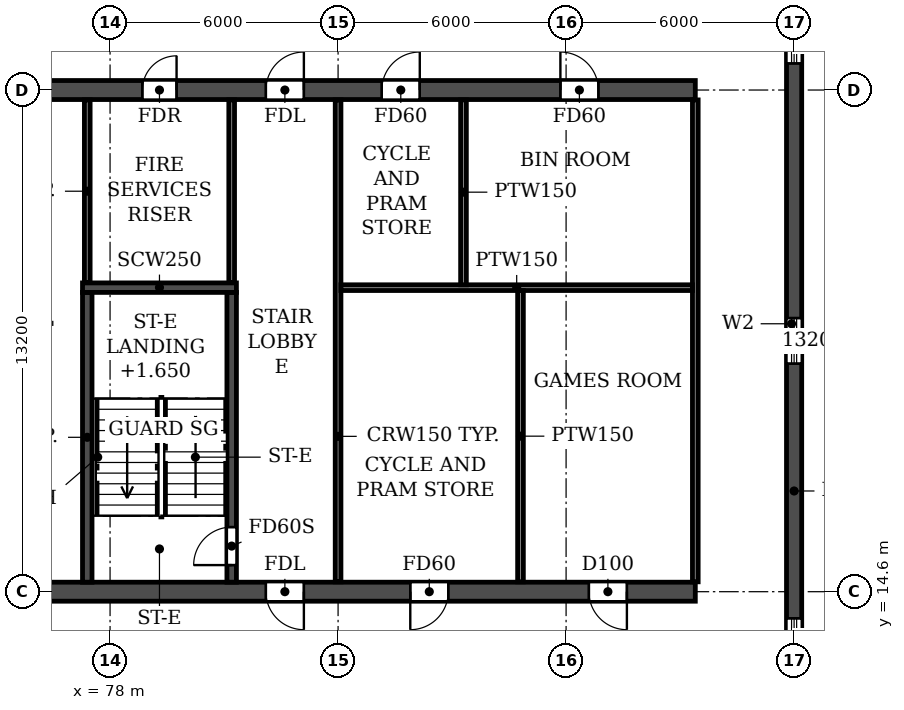
"""IFC4 building model, lengths in metres.
Left out: names, types, materials, properties, quantities, classifications, styles, units other than length and angle.
Written with IfcOpenShell. Run it as: python <this file> out.ifc"""

import sys

from ifc_helpers import new_model, si_unit, direction, frame, frame_2d, origin, place, context, subcontext, project, spatial, rectangle, extrude, element, fill, save


model = new_model("IFC4")
c1 = context("Model", 3, precision=1e-05, world=origin(), true_north=direction((0.0, 1.0)))
c2 = subcontext(c1, "Body", "Model", "MODEL_VIEW")
j1 = project(units=[si_unit("LENGTHUNIT", "METRE"), si_unit("PLANEANGLEUNIT", "RADIAN")], contexts=[c1])
p1 = place(None, origin())
s1 = spatial("IfcSite", under=j1, at=p1, CompositionType="ELEMENT")
p2 = place(p1, origin())
s2 = spatial("IfcBuilding", under=s1, at=p2, CompositionType="ELEMENT")
p3 = place(p2, frame((0.0, 0.0, 82.8)))
s3 = spatial("IfcBuildingStorey", under=s2, at=p3, CompositionType="ELEMENT", Elevation=82.8)
p4 = place(p3, frame((96.0, 4.683, 0.0), z_axis=(0.0, 0.0, 1.0), x_axis=(0.0, 1.0, 0.0)))
e1 = element("IfcWall", 1, at=p4, inside=s3, PredefinedType="SHEAR", context=c2, shape_type="SweptSolid", body=[
    extrude(rectangle(XDim=34.234, YDim=0.4, at=frame_2d((17.117, 0.0))), origin(), (0.0, 0.0, 1.0), 3.06),
])
p5 = place(p4, frame((15.917, 0.0, 0.9)))
e2 = element("IfcOpeningElement", 2, at=p5, cuts=e1, PredefinedType="OPENING", context=c2, shape_type="SweptSolid", body=[
    extrude(rectangle(XDim=1.2, YDim=1.5, at=frame_2d((0.6, 0.75))), frame((0.0, 0.21, 0.0), z_axis=(0.0, -1.0, 0.0), x_axis=(1.0, 0.0, 0.0)), (0.0, 0.0, 1.0), 0.42),
])
p6 = place(p4, frame((23.817, 0.0, 0.9)))
e3 = element("IfcOpeningElement", 3, at=p6, cuts=e1, PredefinedType="OPENING", context=c2, shape_type="SweptSolid", body=[
    extrude(rectangle(XDim=1.2, YDim=1.5, at=frame_2d((0.6, 0.75))), frame((0.0, 0.21, 0.0), z_axis=(0.0, -1.0, 0.0), x_axis=(1.0, 0.0, 0.0)), (0.0, 0.0, 1.0), 0.42),
])
p7 = place(p4, frame((8.017, 0.0, 0.9)))
e4 = element("IfcOpeningElement", 4, at=p7, cuts=e1, PredefinedType="OPENING", context=c2, shape_type="SweptSolid", body=[
    extrude(rectangle(XDim=1.2, YDim=1.5, at=frame_2d((0.6, 0.75))), frame((0.0, 0.21, 0.0), z_axis=(0.0, -1.0, 0.0), x_axis=(1.0, 0.0, 0.0)), (0.0, 0.0, 1.0), 0.42),
])
p8 = place(p4, frame((28.894, 0.0, 0.6)))
e5 = element("IfcOpeningElement", 5, at=p8, cuts=e1, PredefinedType="OPENING", context=c2, shape_type="SweptSolid", body=[
    extrude(rectangle(XDim=2.2, YDim=1.8, at=frame_2d((1.1, 0.9))), frame((0.0, 0.21, 0.0), z_axis=(0.0, -1.0, 0.0), x_axis=(1.0, 0.0, 0.0)), (0.0, 0.0, 1.0), 0.42),
])
p9 = place(p4, frame((2.541, 0.0, 0.6)))
e6 = element("IfcOpeningElement", 6, at=p9, cuts=e1, PredefinedType="OPENING", context=c2, shape_type="SweptSolid", body=[
    extrude(rectangle(XDim=2.2, YDim=1.8, at=frame_2d((1.1, 0.9))), frame((0.0, 0.21, 0.0), z_axis=(0.0, -1.0, 0.0), x_axis=(1.0, 0.0, 0.0)), (0.0, 0.0, 1.0), 0.42),
])
p10 = place(p3, frame((8.6, 14.6, 0.0), z_axis=(0.0, 0.0, 1.0), x_axis=(1.0, 0.0, 0.0)))
e7 = element("IfcWall", 7, at=p10, inside=s3, PredefinedType="SOLIDWALL", context=c2, shape_type="SweptSolid", body=[
    extrude(rectangle(XDim=84.8, YDim=0.5, at=frame_2d((42.4, 0.0))), origin(), (0.0, 0.0, 1.0), 3.06),
])
p11 = place(p10, frame((1.2, 0.0, 0.0)))
e8 = element("IfcOpeningElement", 8, at=p11, cuts=e7, PredefinedType="OPENING", context=c2, shape_type="SweptSolid", body=[
    extrude(rectangle(XDim=1.0, YDim=2.1, at=frame_2d((0.5, 1.05))), frame((0.0, 0.26, 0.0), z_axis=(0.0, -1.0, 0.0), x_axis=(1.0, 0.0, 0.0)), (0.0, 0.0, 1.0), 0.52),
])
p12 = place(p10, frame((5.9, 0.0, 0.0)))
e9 = element("IfcOpeningElement", 9, at=p12, cuts=e7, PredefinedType="OPENING", context=c2, shape_type="SweptSolid", body=[
    extrude(rectangle(XDim=1.0, YDim=2.1, at=frame_2d((0.5, 1.05))), frame((0.0, 0.26, 0.0), z_axis=(0.0, -1.0, 0.0), x_axis=(1.0, 0.0, 0.0)), (0.0, 0.0, 1.0), 0.52),
])
p13 = place(p10, frame((10.3, 0.0, 0.0)))
e10 = element("IfcOpeningElement", 10, at=p13, cuts=e7, PredefinedType="OPENING", context=c2, shape_type="SweptSolid", body=[
    extrude(rectangle(XDim=1.0, YDim=2.1, at=frame_2d((0.5, 1.05))), frame((0.0, 0.26, 0.0), z_axis=(0.0, -1.0, 0.0), x_axis=(1.0, 0.0, 0.0)), (0.0, 0.0, 1.0), 0.52),
])
p14 = place(p10, frame((18.2, 0.0, 0.0)))
e11 = element("IfcOpeningElement", 11, at=p14, cuts=e7, PredefinedType="OPENING", context=c2, shape_type="SweptSolid", body=[
    extrude(rectangle(XDim=1.0, YDim=2.1, at=frame_2d((0.5, 1.05))), frame((0.0, 0.26, 0.0), z_axis=(0.0, -1.0, 0.0), x_axis=(1.0, 0.0, 0.0)), (0.0, 0.0, 1.0), 0.52),
])
p15 = place(p10, frame((22.8, 0.0, 0.0)))
e12 = element("IfcOpeningElement", 12, at=p15, cuts=e7, PredefinedType="OPENING", context=c2, shape_type="SweptSolid", body=[
    extrude(rectangle(XDim=1.0, YDim=2.1, at=frame_2d((0.5, 1.05))), frame((0.0, 0.26, 0.0), z_axis=(0.0, -1.0, 0.0), x_axis=(1.0, 0.0, 0.0)), (0.0, 0.0, 1.0), 0.52),
])
p16 = place(p10, frame((36.7, 0.0, 0.0)))
e13 = element("IfcOpeningElement", 13, at=p16, cuts=e7, PredefinedType="OPENING", context=c2, shape_type="SweptSolid", body=[
    extrude(rectangle(XDim=1.0, YDim=2.1, at=frame_2d((0.5, 1.05))), frame((0.0, 0.26, 0.0), z_axis=(0.0, -1.0, 0.0), x_axis=(1.0, 0.0, 0.0)), (0.0, 0.0, 1.0), 0.52),
])
p17 = place(p10, frame((41.9, 0.0, 0.0)))
e14 = element("IfcOpeningElement", 14, at=p17, cuts=e7, PredefinedType="OPENING", context=c2, shape_type="SweptSolid", body=[
    extrude(rectangle(XDim=1.0, YDim=2.1, at=frame_2d((0.5, 1.05))), frame((0.0, 0.26, 0.0), z_axis=(0.0, -1.0, 0.0), x_axis=(1.0, 0.0, 0.0)), (0.0, 0.0, 1.0), 0.52),
])
p18 = place(p10, frame((44.5, 0.0, 0.0)))
e15 = element("IfcOpeningElement", 15, at=p18, cuts=e7, PredefinedType="OPENING", context=c2, shape_type="SweptSolid", body=[
    extrude(rectangle(XDim=1.0, YDim=2.1, at=frame_2d((0.5, 1.05))), frame((0.0, 0.26, 0.0), z_axis=(0.0, -1.0, 0.0), x_axis=(1.0, 0.0, 0.0)), (0.0, 0.0, 1.0), 0.52),
])
p19 = place(p10, frame((48.4, 0.0, 0.0)))
e16 = element("IfcOpeningElement", 16, at=p19, cuts=e7, PredefinedType="OPENING", context=c2, shape_type="SweptSolid", body=[
    extrude(rectangle(XDim=1.0, YDim=2.1, at=frame_2d((0.5, 1.05))), frame((0.0, 0.26, 0.0), z_axis=(0.0, -1.0, 0.0), x_axis=(1.0, 0.0, 0.0)), (0.0, 0.0, 1.0), 0.52),
])
p20 = place(p10, frame((61.0, 0.0, 0.0)))
e17 = element("IfcOpeningElement", 17, at=p20, cuts=e7, PredefinedType="OPENING", context=c2, shape_type="SweptSolid", body=[
    extrude(rectangle(XDim=1.0, YDim=2.1, at=frame_2d((0.5, 1.05))), frame((0.0, 0.26, 0.0), z_axis=(0.0, -1.0, 0.0), x_axis=(1.0, 0.0, 0.0)), (0.0, 0.0, 1.0), 0.52),
])
p21 = place(p10, frame((65.6, 0.0, 0.0)))
e18 = element("IfcOpeningElement", 18, at=p21, cuts=e7, PredefinedType="OPENING", context=c2, shape_type="SweptSolid", body=[
    extrude(rectangle(XDim=1.0, YDim=2.1, at=frame_2d((0.5, 1.05))), frame((0.0, 0.26, 0.0), z_axis=(0.0, -1.0, 0.0), x_axis=(1.0, 0.0, 0.0)), (0.0, 0.0, 1.0), 0.52),
])
p22 = place(p10, frame((73.5, 0.0, 0.0)))
e19 = element("IfcOpeningElement", 19, at=p22, cuts=e7, PredefinedType="OPENING", context=c2, shape_type="SweptSolid", body=[
    extrude(rectangle(XDim=1.0, YDim=2.1, at=frame_2d((0.5, 1.05))), frame((0.0, 0.26, 0.0), z_axis=(0.0, -1.0, 0.0), x_axis=(1.0, 0.0, 0.0)), (0.0, 0.0, 1.0), 0.52),
])
p23 = place(p10, frame((77.3, 0.0, 0.0)))
e20 = element("IfcOpeningElement", 20, at=p23, cuts=e7, PredefinedType="OPENING", context=c2, shape_type="SweptSolid", body=[
    extrude(rectangle(XDim=1.0, YDim=2.1, at=frame_2d((0.5, 1.05))), frame((0.0, 0.26, 0.0), z_axis=(0.0, -1.0, 0.0), x_axis=(1.0, 0.0, 0.0)), (0.0, 0.0, 1.0), 0.52),
])
p24 = place(p10, frame((82.0, 0.0, 0.0)))
e21 = element("IfcOpeningElement", 21, at=p24, cuts=e7, PredefinedType="OPENING", context=c2, shape_type="SweptSolid", body=[
    extrude(rectangle(XDim=1.0, YDim=2.1, at=frame_2d((0.5, 1.05))), frame((0.0, 0.26, 0.0), z_axis=(0.0, -1.0, 0.0), x_axis=(1.0, 0.0, 0.0)), (0.0, 0.0, 1.0), 0.52),
])
p25 = place(p3, frame((8.6, 27.8, 0.0), z_axis=(0.0, 0.0, 1.0), x_axis=(1.0, 0.0, 0.0)))
e22 = element("IfcWall", 22, at=p25, inside=s3, PredefinedType="SOLIDWALL", context=c2, shape_type="SweptSolid", body=[
    extrude(rectangle(XDim=84.8, YDim=0.5, at=frame_2d((42.4, 0.0))), origin(), (0.0, 0.0, 1.0), 3.06),
])
p26 = place(p25, frame((2.55, 0.0, 0.0)))
e23 = element("IfcOpeningElement", 23, at=p26, cuts=e22, PredefinedType="OPENING", context=c2, shape_type="SweptSolid", body=[
    extrude(rectangle(XDim=1.0, YDim=2.1, at=frame_2d((0.5, 1.05))), frame((0.0, 0.26, 0.0), z_axis=(0.0, -1.0, 0.0), x_axis=(1.0, 0.0, 0.0)), (0.0, 0.0, 1.0), 0.52),
])
p27 = place(p25, frame((7.25, 0.0, 0.0)))
e24 = element("IfcOpeningElement", 24, at=p27, cuts=e22, PredefinedType="OPENING", context=c2, shape_type="SweptSolid", body=[
    extrude(rectangle(XDim=1.0, YDim=2.1, at=frame_2d((0.5, 1.05))), frame((0.0, 0.26, 0.0), z_axis=(0.0, -1.0, 0.0), x_axis=(1.0, 0.0, 0.0)), (0.0, 0.0, 1.0), 0.52),
])
p28 = place(p25, frame((10.3, 0.0, 0.0)))
e25 = element("IfcOpeningElement", 25, at=p28, cuts=e22, PredefinedType="OPENING", context=c2, shape_type="SweptSolid", body=[
    extrude(rectangle(XDim=1.0, YDim=2.1, at=frame_2d((0.5, 1.05))), frame((0.0, 0.26, 0.0), z_axis=(0.0, -1.0, 0.0), x_axis=(1.0, 0.0, 0.0)), (0.0, 0.0, 1.0), 0.52),
])
p29 = place(p25, frame((13.65, 0.0, 0.0)))
e26 = element("IfcOpeningElement", 26, at=p29, cuts=e22, PredefinedType="OPENING", context=c2, shape_type="SweptSolid", body=[
    extrude(rectangle(XDim=0.9, YDim=2.1, at=frame_2d((0.45, 1.05))), frame((0.0, 0.26, 0.0), z_axis=(0.0, -1.0, 0.0), x_axis=(1.0, 0.0, 0.0)), (0.0, 0.0, 1.0), 0.52),
])
p30 = place(p25, frame((22.85, 0.0, 0.0)))
e27 = element("IfcOpeningElement", 27, at=p30, cuts=e22, PredefinedType="OPENING", context=c2, shape_type="SweptSolid", body=[
    extrude(rectangle(XDim=0.9, YDim=2.1, at=frame_2d((0.45, 1.05))), frame((0.0, 0.26, 0.0), z_axis=(0.0, -1.0, 0.0), x_axis=(1.0, 0.0, 0.0)), (0.0, 0.0, 1.0), 0.52),
])
p31 = place(p25, frame((27.3, 0.0, 0.0)))
e28 = element("IfcOpeningElement", 28, at=p31, cuts=e22, PredefinedType="OPENING", context=c2, shape_type="SweptSolid", body=[
    extrude(rectangle(XDim=1.0, YDim=2.1, at=frame_2d((0.5, 1.05))), frame((0.0, 0.26, 0.0), z_axis=(0.0, -1.0, 0.0), x_axis=(1.0, 0.0, 0.0)), (0.0, 0.0, 1.0), 0.52),
])
p32 = place(p25, frame((32.25, 0.0, 0.0)))
e29 = element("IfcOpeningElement", 29, at=p32, cuts=e22, PredefinedType="OPENING", context=c2, shape_type="SweptSolid", body=[
    extrude(rectangle(XDim=1.5, YDim=2.1, at=frame_2d((0.75, 1.05))), frame((0.0, 0.26, 0.0), z_axis=(0.0, -1.0, 0.0), x_axis=(1.0, 0.0, 0.0)), (0.0, 0.0, 1.0), 0.52),
])
p33 = place(p25, frame((39.0, 0.0, 0.0)))
e30 = element("IfcOpeningElement", 30, at=p33, cuts=e22, PredefinedType="OPENING", context=c2, shape_type="SweptSolid", body=[
    extrude(rectangle(XDim=1.0, YDim=2.1, at=frame_2d((0.5, 1.05))), frame((0.0, 0.26, 0.0), z_axis=(0.0, -1.0, 0.0), x_axis=(1.0, 0.0, 0.0)), (0.0, 0.0, 1.0), 0.52),
])
p34 = place(p25, frame((41.9, 0.0, 0.0)))
e31 = element("IfcOpeningElement", 31, at=p34, cuts=e22, PredefinedType="OPENING", context=c2, shape_type="SweptSolid", body=[
    extrude(rectangle(XDim=1.0, YDim=2.1, at=frame_2d((0.5, 1.05))), frame((0.0, 0.26, 0.0), z_axis=(0.0, -1.0, 0.0), x_axis=(1.0, 0.0, 0.0)), (0.0, 0.0, 1.0), 0.52),
])
p35 = place(p25, frame((47.4, 0.0, 0.0)))
e32 = element("IfcOpeningElement", 32, at=p35, cuts=e22, PredefinedType="OPENING", context=c2, shape_type="SweptSolid", body=[
    extrude(rectangle(XDim=1.0, YDim=2.1, at=frame_2d((0.5, 1.05))), frame((0.0, 0.26, 0.0), z_axis=(0.0, -1.0, 0.0), x_axis=(1.0, 0.0, 0.0)), (0.0, 0.0, 1.0), 0.52),
])
p36 = place(p25, frame((52.6, 0.0, 0.0)))
e33 = element("IfcOpeningElement", 33, at=p36, cuts=e22, PredefinedType="OPENING", context=c2, shape_type="SweptSolid", body=[
    extrude(rectangle(XDim=1.0, YDim=2.1, at=frame_2d((0.5, 1.05))), frame((0.0, 0.26, 0.0), z_axis=(0.0, -1.0, 0.0), x_axis=(1.0, 0.0, 0.0)), (0.0, 0.0, 1.0), 0.52),
])
p37 = place(p25, frame((56.5, 0.0, 0.0)))
e34 = element("IfcOpeningElement", 34, at=p37, cuts=e22, PredefinedType="OPENING", context=c2, shape_type="SweptSolid", body=[
    extrude(rectangle(XDim=1.0, YDim=2.1, at=frame_2d((0.5, 1.05))), frame((0.0, 0.26, 0.0), z_axis=(0.0, -1.0, 0.0), x_axis=(1.0, 0.0, 0.0)), (0.0, 0.0, 1.0), 0.52),
])
p38 = place(p25, frame((61.05, 0.0, 0.0)))
e35 = element("IfcOpeningElement", 35, at=p38, cuts=e22, PredefinedType="OPENING", context=c2, shape_type="SweptSolid", body=[
    extrude(rectangle(XDim=0.9, YDim=2.1, at=frame_2d((0.45, 1.05))), frame((0.0, 0.26, 0.0), z_axis=(0.0, -1.0, 0.0), x_axis=(1.0, 0.0, 0.0)), (0.0, 0.0, 1.0), 0.52),
])
p39 = place(p25, frame((70.25, 0.0, 0.0)))
e36 = element("IfcOpeningElement", 36, at=p39, cuts=e22, PredefinedType="OPENING", context=c2, shape_type="SweptSolid", body=[
    extrude(rectangle(XDim=0.9, YDim=2.1, at=frame_2d((0.45, 1.05))), frame((0.0, 0.26, 0.0), z_axis=(0.0, -1.0, 0.0), x_axis=(1.0, 0.0, 0.0)), (0.0, 0.0, 1.0), 0.52),
])
p40 = place(p25, frame((73.5, 0.0, 0.0)))
e37 = element("IfcOpeningElement", 37, at=p40, cuts=e22, PredefinedType="OPENING", context=c2, shape_type="SweptSolid", body=[
    extrude(rectangle(XDim=1.0, YDim=2.1, at=frame_2d((0.5, 1.05))), frame((0.0, 0.26, 0.0), z_axis=(0.0, -1.0, 0.0), x_axis=(1.0, 0.0, 0.0)), (0.0, 0.0, 1.0), 0.52),
])
p41 = place(p25, frame((76.55, 0.0, 0.0)))
e38 = element("IfcOpeningElement", 38, at=p41, cuts=e22, PredefinedType="OPENING", context=c2, shape_type="SweptSolid", body=[
    extrude(rectangle(XDim=1.0, YDim=2.1, at=frame_2d((0.5, 1.05))), frame((0.0, 0.26, 0.0), z_axis=(0.0, -1.0, 0.0), x_axis=(1.0, 0.0, 0.0)), (0.0, 0.0, 1.0), 0.52),
])
p42 = place(p25, frame((81.25, 0.0, 0.0)))
e39 = element("IfcOpeningElement", 39, at=p42, cuts=e22, PredefinedType="OPENING", context=c2, shape_type="SweptSolid", body=[
    extrude(rectangle(XDim=1.0, YDim=2.1, at=frame_2d((0.5, 1.05))), frame((0.0, 0.26, 0.0), z_axis=(0.0, -1.0, 0.0), x_axis=(1.0, 0.0, 0.0)), (0.0, 0.0, 1.0), 0.52),
])
p43 = place(p3, frame((77.4, 14.85, 0.0), z_axis=(0.0, 0.0, 1.0), x_axis=(0.0, 1.0, 0.0)))
e40 = element("IfcWall", 40, at=p43, inside=s3, PredefinedType="SOLIDWALL", context=c2, shape_type="SweptSolid", body=[
    extrude(rectangle(XDim=7.625, YDim=0.25, at=frame_2d((3.812, 0.0))), origin(), (0.0, 0.0, 1.0), 3.06),
])
p44 = place(p3, frame((81.2, 14.85, 0.0), z_axis=(0.0, 0.0, 1.0), x_axis=(0.0, 1.0, 0.0)))
e41 = element("IfcWall", 41, at=p44, inside=s3, PredefinedType="SOLIDWALL", context=c2, shape_type="SweptSolid", body=[
    extrude(rectangle(XDim=7.625, YDim=0.25, at=frame_2d((3.812, 0.0))), origin(), (0.0, 0.0, 1.0), 3.06),
])
p45 = place(p44, frame((0.45, 0.0, 0.0)))
e42 = element("IfcOpeningElement", 42, at=p45, cuts=e41, PredefinedType="OPENING", context=c2, shape_type="SweptSolid", body=[
    extrude(rectangle(XDim=1.0, YDim=2.1, at=frame_2d((0.5, 1.05))), frame((0.0, 0.135, 0.0), z_axis=(0.0, -1.0, 0.0), x_axis=(1.0, 0.0, 0.0)), (0.0, 0.0, 1.0), 0.27),
])
p46 = place(p3, frame((77.275, 22.6, 0.0), z_axis=(0.0, 0.0, 1.0), x_axis=(1.0, 0.0, 0.0)))
e43 = element("IfcWall", 43, at=p46, inside=s3, PredefinedType="SOLIDWALL", context=c2, shape_type="SweptSolid", body=[
    extrude(rectangle(XDim=4.05, YDim=0.25, at=frame_2d((2.025, 0.0))), origin(), (0.0, 0.0, 1.0), 3.06),
])
for number, where, z_axis, x_axis in (
    (44, (84.0, 14.86, 0.0), (0.0, 0.0, 1.0), (0.0, 1.0, 0.0)),
    (45, (93.4, 14.86, 0.0), (0.0, 0.0, 1.0), (0.0, 1.0, 0.0)),
):
    element("IfcWall", number, at=place(p3, frame(where, z_axis=z_axis, x_axis=x_axis)), inside=s3, PredefinedType="PARTITIONING", context=c2, shape_type="SweptSolid", body=[
        extrude(rectangle(XDim=12.68, YDim=0.15, at=frame_2d((6.34, 0.0))), origin(), (0.0, 0.0, 1.0), 3.06),
    ])
p47 = place(p3, frame((84.075, 22.6, 0.0), z_axis=(0.0, 0.0, 1.0), x_axis=(1.0, 0.0, 0.0)))
e46 = element("IfcWall", 46, at=p47, inside=s3, PredefinedType="PARTITIONING", context=c2, shape_type="SweptSolid", body=[
    extrude(rectangle(XDim=9.25, YDim=0.15, at=frame_2d((4.625, 0.0))), origin(), (0.0, 0.0, 1.0), 3.06),
])
p48 = place(p3, frame((87.3, 22.675, 0.0), z_axis=(0.0, 0.0, 1.0), x_axis=(0.0, 1.0, 0.0)))
e47 = element("IfcWall", 47, at=p48, inside=s3, PredefinedType="PARTITIONING", context=c2, shape_type="SweptSolid", body=[
    extrude(rectangle(XDim=4.865, YDim=0.15, at=frame_2d((2.433, 0.0))), origin(), (0.0, 0.0, 1.0), 3.06),
])
p49 = place(p3, frame((88.8, 14.86, 0.0), z_axis=(0.0, 0.0, 1.0), x_axis=(0.0, 1.0, 0.0)))
e48 = element("IfcWall", 48, at=p49, inside=s3, PredefinedType="PARTITIONING", context=c2, shape_type="SweptSolid", body=[
    extrude(rectangle(XDim=7.665, YDim=0.15, at=frame_2d((3.833, 0.0))), origin(), (0.0, 0.0, 1.0), 3.06),
])
for number, where, z_axis, x_axis in (
    (49, (77.4, 22.735, 0.0), (0.0, 0.0, 1.0), (0.0, 1.0, 0.0)),
    (50, (81.2, 22.735, 0.0), (0.0, 0.0, 1.0), (0.0, 1.0, 0.0)),
):
    element("IfcWall", number, at=place(p3, frame(where, z_axis=z_axis, x_axis=x_axis)), inside=s3, PredefinedType="PARTITIONING", context=c2, shape_type="SweptSolid", body=[
        extrude(rectangle(XDim=4.805, YDim=0.15, at=frame_2d((2.402, 0.0))), origin(), (0.0, 0.0, 1.0), 3.06),
    ])
p50 = place(p5, origin())
e51 = element("IfcWindow", 51, at=p50, inside=s3, PartitioningType="SINGLE_PANEL", PredefinedType="WINDOW", context=c2, shape_type="SweptSolid", body=[
    extrude(rectangle(XDim=1.2, YDim=1.5, at=frame_2d((0.6, 0.75))), frame((0.0, 0.03, 0.0), z_axis=(0.0, -1.0, 0.0), x_axis=(1.0, 0.0, 0.0)), (0.0, 0.0, 1.0), 0.06),
])
fill(e2, e51)
p51 = place(p6, origin())
e52 = element("IfcWindow", 52, at=p51, inside=s3, PartitioningType="SINGLE_PANEL", PredefinedType="WINDOW", context=c2, shape_type="SweptSolid", body=[
    extrude(rectangle(XDim=1.2, YDim=1.5, at=frame_2d((0.6, 0.75))), frame((0.0, 0.03, 0.0), z_axis=(0.0, -1.0, 0.0), x_axis=(1.0, 0.0, 0.0)), (0.0, 0.0, 1.0), 0.06),
])
fill(e3, e52)
p52 = place(p7, origin())
e53 = element("IfcWindow", 53, at=p52, inside=s3, PartitioningType="SINGLE_PANEL", PredefinedType="WINDOW", context=c2, shape_type="SweptSolid", body=[
    extrude(rectangle(XDim=1.2, YDim=1.5, at=frame_2d((0.6, 0.75))), frame((0.0, 0.03, 0.0), z_axis=(0.0, -1.0, 0.0), x_axis=(1.0, 0.0, 0.0)), (0.0, 0.0, 1.0), 0.06),
])
fill(e4, e53)
p53 = place(p39, origin())
e54 = element("IfcDoor", 54, at=p53, inside=s3, OperationType="SINGLE_SWING_RIGHT", PredefinedType="DOOR", context=c2, shape_type="SweptSolid", body=[
    extrude(rectangle(XDim=0.9, YDim=2.1, at=frame_2d((0.45, 1.05))), frame((0.0, 0.025, 0.0), z_axis=(0.0, -1.0, 0.0), x_axis=(1.0, 0.0, 0.0)), (0.0, 0.0, 1.0), 0.05),
])
fill(e36, e54)
p54 = place(p40, origin())
e55 = element("IfcDoor", 55, at=p54, inside=s3, OperationType="SINGLE_SWING_RIGHT", PredefinedType="DOOR", context=c2, shape_type="SweptSolid", body=[
    extrude(rectangle(XDim=1.0, YDim=2.1, at=frame_2d((0.5, 1.05))), frame((0.0, 0.025, 0.0), z_axis=(0.0, -1.0, 0.0), x_axis=(1.0, 0.0, 0.0)), (0.0, 0.0, 1.0), 0.05),
])
fill(e37, e55)
p55 = place(p41, origin())
e56 = element("IfcDoor", 56, at=p55, inside=s3, OperationType="SINGLE_SWING_RIGHT", PredefinedType="DOOR", context=c2, shape_type="SweptSolid", body=[
    extrude(rectangle(XDim=1.0, YDim=2.1, at=frame_2d((0.5, 1.05))), frame((0.0, 0.025, 0.0), z_axis=(0.0, -1.0, 0.0), x_axis=(1.0, 0.0, 0.0)), (0.0, 0.0, 1.0), 0.05),
])
fill(e38, e56)
p56 = place(p42, origin())
e57 = element("IfcDoor", 57, at=p56, inside=s3, OperationType="SINGLE_SWING_LEFT", PredefinedType="DOOR", context=c2, shape_type="SweptSolid", body=[
    extrude(rectangle(XDim=1.0, YDim=2.1, at=frame_2d((0.5, 1.05))), frame((0.0, 0.025, 0.0), z_axis=(0.0, -1.0, 0.0), x_axis=(1.0, 0.0, 0.0)), (0.0, 0.0, 1.0), 0.05),
])
fill(e39, e57)
p57 = place(p22, frame((1.0, 0.0, 0.0), z_axis=(0.0, 0.0, 1.0), x_axis=(-1.0, 0.0, 0.0)))
e58 = element("IfcDoor", 58, at=p57, inside=s3, OperationType="SINGLE_SWING_LEFT", PredefinedType="DOOR", context=c2, shape_type="SweptSolid", body=[
    extrude(rectangle(XDim=1.0, YDim=2.1, at=frame_2d((0.5, 1.05))), frame((0.0, 0.025, 0.0), z_axis=(0.0, -1.0, 0.0), x_axis=(1.0, 0.0, 0.0)), (0.0, 0.0, 1.0), 0.05),
])
fill(e19, e58)
p58 = place(p23, frame((1.0, 0.0, 0.0), z_axis=(0.0, 0.0, 1.0), x_axis=(-1.0, 0.0, 0.0)))
e59 = element("IfcDoor", 59, at=p58, inside=s3, OperationType="SINGLE_SWING_RIGHT", PredefinedType="DOOR", context=c2, shape_type="SweptSolid", body=[
    extrude(rectangle(XDim=1.0, YDim=2.1, at=frame_2d((0.5, 1.05))), frame((0.0, 0.025, 0.0), z_axis=(0.0, -1.0, 0.0), x_axis=(1.0, 0.0, 0.0)), (0.0, 0.0, 1.0), 0.05),
])
fill(e20, e59)
p59 = place(p24, frame((1.0, 0.0, 0.0), z_axis=(0.0, 0.0, 1.0), x_axis=(-1.0, 0.0, 0.0)))
e60 = element("IfcDoor", 60, at=p59, inside=s3, OperationType="SINGLE_SWING_LEFT", PredefinedType="DOOR", context=c2, shape_type="SweptSolid", body=[
    extrude(rectangle(XDim=1.0, YDim=2.1, at=frame_2d((0.5, 1.05))), frame((0.0, 0.025, 0.0), z_axis=(0.0, -1.0, 0.0), x_axis=(1.0, 0.0, 0.0)), (0.0, 0.0, 1.0), 0.05),
])
fill(e21, e60)
p60 = place(p45, origin())
e61 = element("IfcDoor", 61, at=p60, inside=s3, OperationType="SINGLE_SWING_LEFT", PredefinedType="DOOR", context=c2, shape_type="SweptSolid", body=[
    extrude(rectangle(XDim=1.0, YDim=2.1, at=frame_2d((0.5, 1.05))), frame((0.0, 0.025, 0.0), z_axis=(0.0, -1.0, 0.0), x_axis=(1.0, 0.0, 0.0)), (0.0, 0.0, 1.0), 0.05),
])
fill(e42, e61)
save(model, sys.argv[1])
